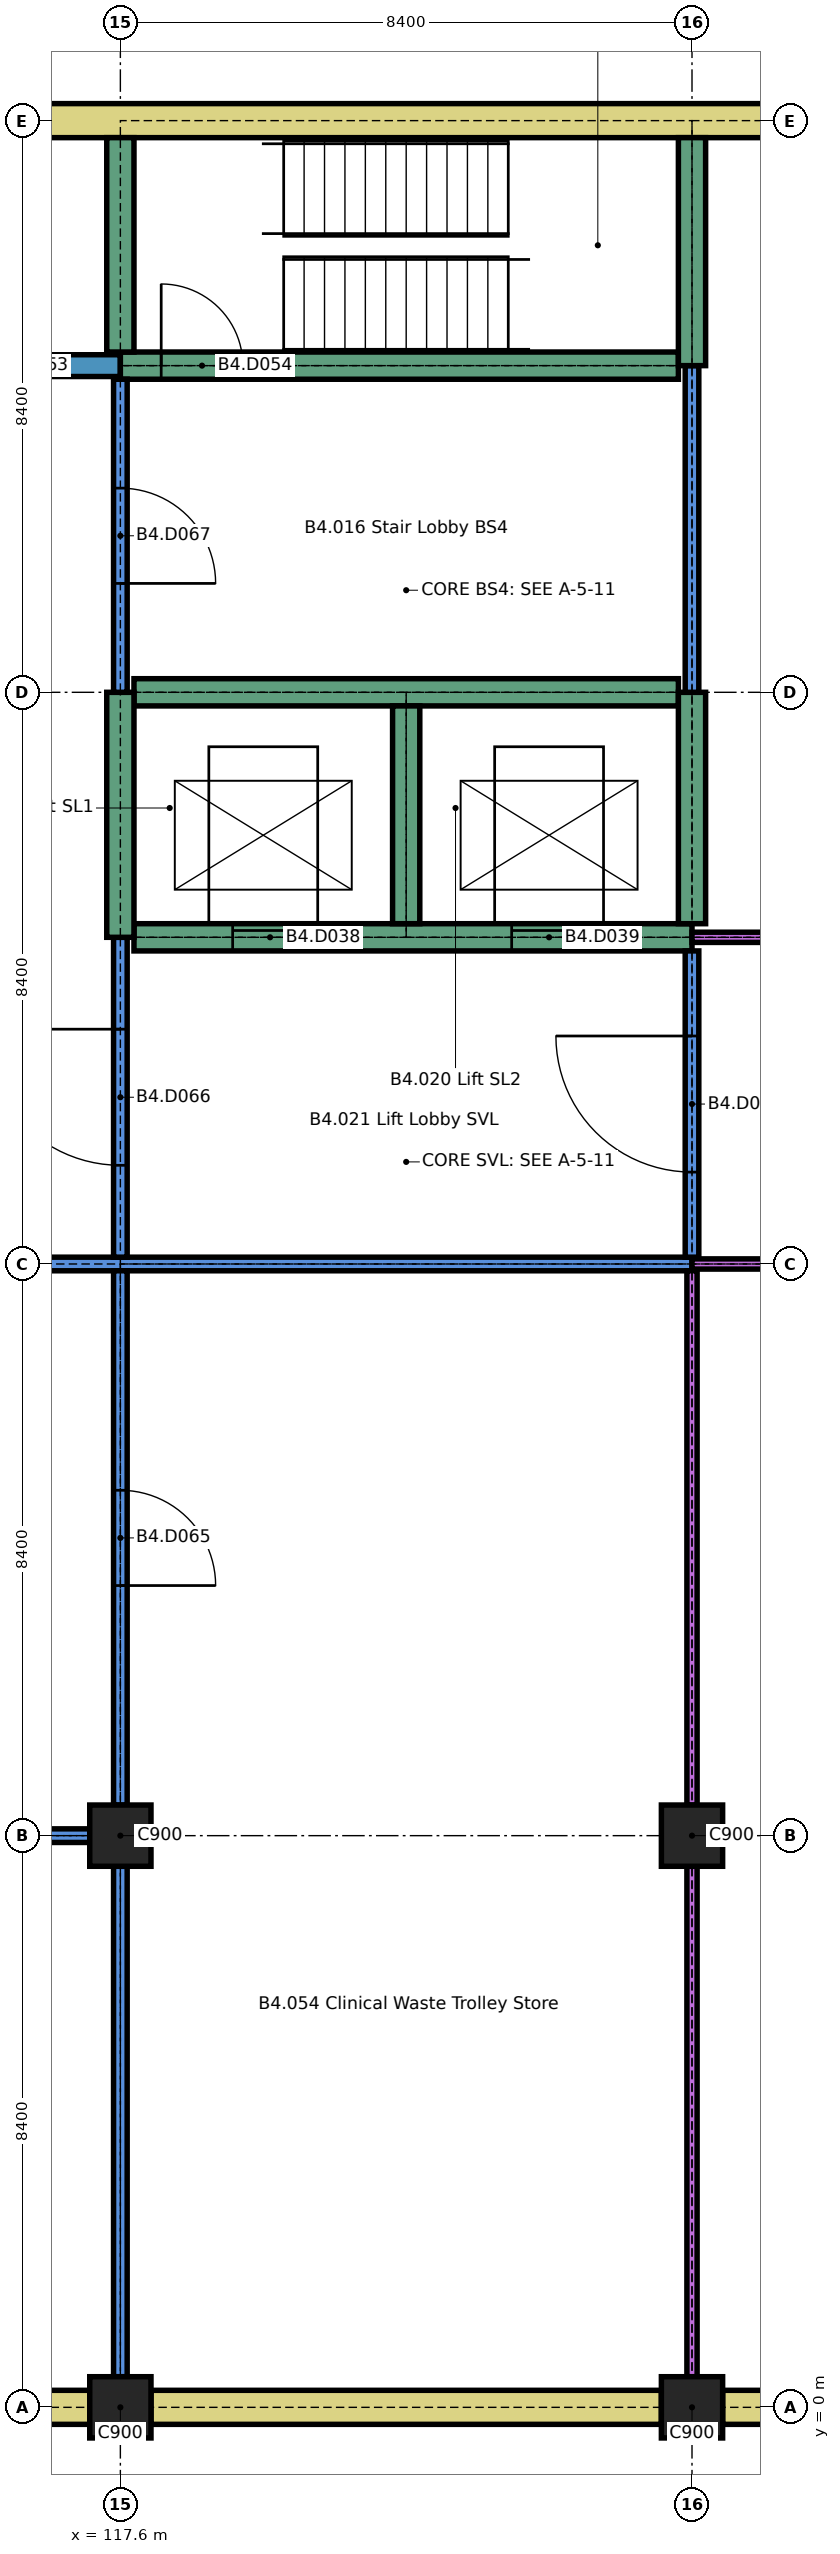
"""IFC4 building model, lengths in metres.
Left out: names, types, materials, properties, quantities, classifications, styles, units other than length and angle.
Written with IfcOpenShell. Run it as: python <this file> out.ifc"""

import sys

from ifc_helpers import new_model, si_unit, direction, frame, frame_2d, origin, origin_2d, place, context, subcontext, project, spatial, rectangle, extrude, element, fill, save


model = new_model("IFC4")
c1 = context("Model", 3, precision=1e-05, world=origin(), true_north=direction((0.0, 1.0)))
c2 = subcontext(c1, "Body", "Model", "MODEL_VIEW")
j1 = project(units=[si_unit("LENGTHUNIT", "METRE"), si_unit("PLANEANGLEUNIT", "RADIAN")], contexts=[c1])
p1 = place(None, origin())
s1 = spatial("IfcSite", under=j1, at=p1, CompositionType="ELEMENT")
p2 = place(p1, origin())
s2 = spatial("IfcBuilding", under=s1, at=p2, CompositionType="ELEMENT")
p3 = place(p2, frame((0.0, 0.0, -15.0)))
s3 = spatial("IfcBuildingStorey", under=s2, at=p3, CompositionType="ELEMENT", Elevation=-15.0)
for number, where, z_axis, x_axis in (
    (1, (117.6, 0.0, 0.0), (0.0, 0.0, 1.0), (1.0, 0.0, 0.0)),
    (2, (126.0, 0.0, 0.0), (0.0, 0.0, 1.0), (1.0, 0.0, 0.0)),
    (3, (117.6, 8.4, 0.0), (0.0, 0.0, 1.0), (1.0, 0.0, 0.0)),
    (4, (126.0, 8.4, 0.0), (0.0, 0.0, 1.0), (1.0, 0.0, 0.0)),
):
    element("IfcColumn", number, at=place(p3, frame(where, z_axis=z_axis, x_axis=x_axis)), inside=s3, PredefinedType="COLUMN", context=c2, shape_type="SweptSolid", body=[
        extrude(rectangle(XDim=0.9, YDim=0.9, at=origin_2d()), origin(), (0.0, 0.0, 1.0), 3.2),
    ])
for number, where, z_axis, x_axis in (
    (5, (109.65, 0.0, 0.0), (0.0, 0.0, 1.0), (1.0, 0.0, 0.0)),
    (6, (118.05, 0.0, 0.0), (0.0, 0.0, 1.0), (1.0, 0.0, 0.0)),
    (7, (126.45, 0.0, 0.0), (0.0, 0.0, 1.0), (1.0, 0.0, 0.0)),
):
    element("IfcWall", number, at=place(p3, frame(where, z_axis=z_axis, x_axis=x_axis)), inside=s3, PredefinedType="SOLIDWALL", context=c2, shape_type="SweptSolid", body=[
        extrude(rectangle(XDim=7.5, YDim=0.5, at=frame_2d((3.75, 0.0))), origin(), (0.0, 0.0, 1.0), 3.2),
    ])
p4 = place(p3, frame((101.25, 33.6, 0.0), z_axis=(0.0, 0.0, 1.0), x_axis=(1.0, 0.0, 0.0)))
e8 = element("IfcWall", 8, at=p4, inside=s3, PredefinedType="SOLIDWALL", context=c2, shape_type="SweptSolid", body=[
    extrude(rectangle(XDim=32.7, YDim=0.5, at=frame_2d((16.35, 0.0))), origin(), (0.0, 0.0, 1.0), 3.2),
])
p5 = place(p3, frame((109.65, 8.4, 0.0), z_axis=(0.0, 0.0, 1.0), x_axis=(1.0, 0.0, 0.0)))
e9 = element("IfcWall", 9, at=p5, inside=s3, PredefinedType="PARTITIONING", context=c2, shape_type="SweptSolid", body=[
    extrude(rectangle(XDim=7.5, YDim=0.2, at=frame_2d((3.75, 0.0))), origin(), (0.0, 0.0, 1.0), 3.2),
])
p6 = place(p5, frame((3.05, 0.0, 0.0)))
e10 = element("IfcOpeningElement", 10, at=p6, cuts=e9, PredefinedType="OPENING", context=c2, shape_type="SweptSolid", body=[
    extrude(rectangle(XDim=1.4, YDim=2.1, at=frame_2d((0.7, 1.05))), frame((0.0, 0.11, 0.0), z_axis=(0.0, -1.0, 0.0), x_axis=(1.0, 0.0, 0.0)), (0.0, 0.0, 1.0), 0.22),
])
p7 = place(p3, frame((109.65, 16.8, 0.0), z_axis=(0.0, 0.0, 1.0), x_axis=(1.0, 0.0, 0.0)))
e11 = element("IfcWall", 11, at=p7, inside=s3, PredefinedType="PARTITIONING", context=c2, shape_type="SweptSolid", body=[
    extrude(rectangle(XDim=16.35, YDim=0.2, at=frame_2d((8.175, 0.0))), origin(), (0.0, 0.0, 1.0), 3.2),
])
p8 = place(p7, frame((3.275, 0.0, 0.0)))
e12 = element("IfcOpeningElement", 12, at=p8, cuts=e11, PredefinedType="OPENING", context=c2, shape_type="SweptSolid", body=[
    extrude(rectangle(XDim=1.4, YDim=2.1, at=frame_2d((0.7, 1.05))), frame((0.0, 0.11, 0.0), z_axis=(0.0, -1.0, 0.0), x_axis=(1.0, 0.0, 0.0)), (0.0, 0.0, 1.0), 0.22),
])
p9 = place(p3, frame((126.0, 16.8, 0.0), z_axis=(0.0, 0.0, 1.0), x_axis=(1.0, 0.0, 0.0)))
e13 = element("IfcWall", 13, at=p9, inside=s3, PredefinedType="PARTITIONING", context=c2, shape_type="SweptSolid", body=[
    extrude(rectangle(XDim=7.95, YDim=0.15, at=frame_2d((3.975, 0.0))), origin(), (0.0, 0.0, 1.0), 3.2),
])
p10 = place(p9, frame((3.275, 0.0, 0.0)))
e14 = element("IfcOpeningElement", 14, at=p10, cuts=e13, PredefinedType="OPENING", context=c2, shape_type="SweptSolid", body=[
    extrude(rectangle(XDim=1.4, YDim=2.1, at=frame_2d((0.7, 1.05))), frame((0.0, 0.085, 0.0), z_axis=(0.0, -1.0, 0.0), x_axis=(1.0, 0.0, 0.0)), (0.0, 0.0, 1.0), 0.17),
])
p11 = place(p3, frame((117.8, 21.6, 0.0), z_axis=(0.0, 0.0, 1.0), x_axis=(1.0, 0.0, 0.0)))
e15 = element("IfcWall", 15, at=p11, inside=s3, PredefinedType="SHEAR", context=c2, shape_type="SweptSolid", body=[
    extrude(rectangle(XDim=8.2, YDim=0.4, at=frame_2d((4.1, 0.0))), origin(), (0.0, 0.0, 1.0), 3.2),
])
p12 = place(p11, frame((1.45, 0.0, 0.0)))
e16 = element("IfcOpeningElement", 16, at=p12, cuts=e15, PredefinedType="OPENING", context=c2, shape_type="SweptSolid", body=[
    extrude(rectangle(XDim=1.1, YDim=2.1, at=frame_2d((0.55, 1.05))), frame((0.0, 0.21, 0.0), z_axis=(0.0, -1.0, 0.0), x_axis=(1.0, 0.0, 0.0)), (0.0, 0.0, 1.0), 0.42),
])
p13 = place(p11, frame((5.55, 0.0, 0.0)))
e17 = element("IfcOpeningElement", 17, at=p13, cuts=e15, PredefinedType="OPENING", context=c2, shape_type="SweptSolid", body=[
    extrude(rectangle(XDim=1.1, YDim=2.1, at=frame_2d((0.55, 1.05))), frame((0.0, 0.21, 0.0), z_axis=(0.0, -1.0, 0.0), x_axis=(1.0, 0.0, 0.0)), (0.0, 0.0, 1.0), 0.42),
])
p14 = place(p3, frame((126.0, 21.6, 0.0), z_axis=(0.0, 0.0, 1.0), x_axis=(1.0, 0.0, 0.0)))
e18 = element("IfcWall", 18, at=p14, inside=s3, PredefinedType="PARTITIONING", context=c2, shape_type="SweptSolid", body=[
    extrude(rectangle(XDim=12.675, YDim=0.15, at=frame_2d((6.337, 0.0))), origin(), (0.0, 0.0, 1.0), 3.2),
])
p15 = place(p14, frame((3.5, 0.0, 0.0)))
e19 = element("IfcOpeningElement", 19, at=p15, cuts=e18, PredefinedType="OPENING", context=c2, shape_type="SweptSolid", body=[
    extrude(rectangle(XDim=1.4, YDim=2.1, at=frame_2d((0.7, 1.05))), frame((0.0, 0.085, 0.0), z_axis=(0.0, -1.0, 0.0), x_axis=(1.0, 0.0, 0.0)), (0.0, 0.0, 1.0), 0.17),
])
p16 = place(p14, frame((9.8, 0.0, 0.0)))
e20 = element("IfcOpeningElement", 20, at=p16, cuts=e18, PredefinedType="OPENING", context=c2, shape_type="SweptSolid", body=[
    extrude(rectangle(XDim=1.4, YDim=2.1, at=frame_2d((0.7, 1.05))), frame((0.0, 0.085, 0.0), z_axis=(0.0, -1.0, 0.0), x_axis=(1.0, 0.0, 0.0)), (0.0, 0.0, 1.0), 0.17),
])
p17 = place(p3, frame((117.8, 25.2, 0.0), z_axis=(0.0, 0.0, 1.0), x_axis=(1.0, 0.0, 0.0)))
e21 = element("IfcWall", 21, at=p17, inside=s3, PredefinedType="SHEAR", context=c2, shape_type="SweptSolid", body=[
    extrude(rectangle(XDim=8.0, YDim=0.4, at=frame_2d((4.0, 0.0))), origin(), (0.0, 0.0, 1.0), 3.2),
])
p18 = place(p3, frame((113.24, 30.0, 0.0), z_axis=(0.0, 0.0, 1.0), x_axis=(1.0, 0.0, 0.0)))
e22 = element("IfcWall", 22, at=p18, inside=s3, PredefinedType="SOLIDWALL", context=c2, shape_type="SweptSolid", body=[
    extrude(rectangle(XDim=4.36, YDim=0.32, at=frame_2d((2.18, 0.0))), origin(), (0.0, 0.0, 1.0), 3.2),
])
p19 = place(p18, frame((1.56, 0.0, 0.0)))
e23 = element("IfcOpeningElement", 23, at=p19, cuts=e22, PredefinedType="OPENING", context=c2, shape_type="SweptSolid", body=[
    extrude(rectangle(XDim=1.4, YDim=2.1, at=frame_2d((0.7, 1.05))), frame((0.0, 0.17, 0.0), z_axis=(0.0, -1.0, 0.0), x_axis=(1.0, 0.0, 0.0)), (0.0, 0.0, 1.0), 0.34),
])
p20 = place(p3, frame((117.6, 30.0, 0.0), z_axis=(0.0, 0.0, 1.0), x_axis=(1.0, 0.0, 0.0)))
e24 = element("IfcWall", 24, at=p20, inside=s3, PredefinedType="SHEAR", context=c2, shape_type="SweptSolid", body=[
    extrude(rectangle(XDim=8.2, YDim=0.4, at=frame_2d((4.1, 0.0))), origin(), (0.0, 0.0, 1.0), 3.2),
])
p21 = place(p20, frame((0.6, 0.0, 0.0)))
e25 = element("IfcOpeningElement", 25, at=p21, cuts=e24, PredefinedType="OPENING", context=c2, shape_type="SweptSolid", body=[
    extrude(rectangle(XDim=1.2, YDim=2.1, at=frame_2d((0.6, 1.05))), frame((0.0, 0.21, 0.0), z_axis=(0.0, -1.0, 0.0), x_axis=(1.0, 0.0, 0.0)), (0.0, 0.0, 1.0), 0.42),
])
p22 = place(p3, frame((117.6, 0.45, 0.0), z_axis=(0.0, 0.0, 1.0), x_axis=(0.0, 1.0, 0.0)))
e26 = element("IfcWall", 26, at=p22, inside=s3, PredefinedType="PARTITIONING", context=c2, shape_type="SweptSolid", body=[
    extrude(rectangle(XDim=7.5, YDim=0.2, at=frame_2d((3.75, 0.0))), origin(), (0.0, 0.0, 1.0), 3.2),
])
p23 = place(p3, frame((117.6, 8.85, 0.0), z_axis=(0.0, 0.0, 1.0), x_axis=(0.0, 1.0, 0.0)))
e27 = element("IfcWall", 27, at=p23, inside=s3, PredefinedType="PARTITIONING", context=c2, shape_type="SweptSolid", body=[
    extrude(rectangle(XDim=7.85, YDim=0.2, at=frame_2d((3.925, 0.0))), origin(), (0.0, 0.0, 1.0), 3.2),
])
p24 = place(p23, frame((3.225, 0.0, 0.0)))
e28 = element("IfcOpeningElement", 28, at=p24, cuts=e27, PredefinedType="OPENING", context=c2, shape_type="SweptSolid", body=[
    extrude(rectangle(XDim=1.4, YDim=2.1, at=frame_2d((0.7, 1.05))), frame((0.0, 0.11, 0.0), z_axis=(0.0, -1.0, 0.0), x_axis=(1.0, 0.0, 0.0)), (0.0, 0.0, 1.0), 0.22),
])
p25 = place(p3, frame((117.6, 16.9, 0.0), z_axis=(0.0, 0.0, 1.0), x_axis=(0.0, 1.0, 0.0)))
e29 = element("IfcWall", 29, at=p25, inside=s3, PredefinedType="PARTITIONING", context=c2, shape_type="SweptSolid", body=[
    extrude(rectangle(XDim=4.7, YDim=0.2, at=frame_2d((2.35, 0.0))), origin(), (0.0, 0.0, 1.0), 3.2),
])
p26 = place(p25, frame((1.35, 0.0, 0.0)))
e30 = element("IfcOpeningElement", 30, at=p26, cuts=e29, PredefinedType="OPENING", context=c2, shape_type="SweptSolid", body=[
    extrude(rectangle(XDim=2.0, YDim=2.4, at=frame_2d((1.0, 1.2))), frame((0.0, 0.11, 0.0), z_axis=(0.0, -1.0, 0.0), x_axis=(1.0, 0.0, 0.0)), (0.0, 0.0, 1.0), 0.22),
])
p27 = place(p3, frame((117.6, 21.6, 0.0), z_axis=(0.0, 0.0, 1.0), x_axis=(0.0, 1.0, 0.0)))
e31 = element("IfcWall", 31, at=p27, inside=s3, PredefinedType="SHEAR", context=c2, shape_type="SweptSolid", body=[
    extrude(rectangle(XDim=3.6, YDim=0.4, at=frame_2d((1.8, 0.0))), origin(), (0.0, 0.0, 1.0), 3.2),
])
p28 = place(p3, frame((117.6, 25.2, 0.0), z_axis=(0.0, 0.0, 1.0), x_axis=(0.0, 1.0, 0.0)))
e32 = element("IfcWall", 32, at=p28, inside=s3, PredefinedType="PARTITIONING", context=c2, shape_type="SweptSolid", body=[
    extrude(rectangle(XDim=4.6, YDim=0.2, at=frame_2d((2.3, 0.0))), origin(), (0.0, 0.0, 1.0), 3.2),
])
p29 = place(p28, frame((1.6, 0.0, 0.0)))
e33 = element("IfcOpeningElement", 33, at=p29, cuts=e32, PredefinedType="OPENING", context=c2, shape_type="SweptSolid", body=[
    extrude(rectangle(XDim=1.4, YDim=2.1, at=frame_2d((0.7, 1.05))), frame((0.0, 0.11, 0.0), z_axis=(0.0, -1.0, 0.0), x_axis=(1.0, 0.0, 0.0)), (0.0, 0.0, 1.0), 0.22),
])
p30 = place(p3, frame((117.6, 30.2, 0.0), z_axis=(0.0, 0.0, 1.0), x_axis=(0.0, 1.0, 0.0)))
e34 = element("IfcWall", 34, at=p30, inside=s3, PredefinedType="SHEAR", context=c2, shape_type="SweptSolid", body=[
    extrude(rectangle(XDim=3.15, YDim=0.4, at=frame_2d((1.575, 0.0))), origin(), (0.0, 0.0, 1.0), 3.2),
])
p31 = place(p3, frame((121.8, 21.8, 0.0), z_axis=(0.0, 0.0, 1.0), x_axis=(0.0, 1.0, 0.0)))
e35 = element("IfcWall", 35, at=p31, inside=s3, PredefinedType="SHEAR", context=c2, shape_type="SweptSolid", body=[
    extrude(rectangle(XDim=3.2, YDim=0.4, at=frame_2d((1.6, 0.0))), origin(), (0.0, 0.0, 1.0), 3.2),
])
p32 = place(p3, frame((126.0, 0.45, 0.0), z_axis=(0.0, 0.0, 1.0), x_axis=(0.0, 1.0, 0.0)))
e36 = element("IfcWall", 36, at=p32, inside=s3, PredefinedType="PARTITIONING", context=c2, shape_type="SweptSolid", body=[
    extrude(rectangle(XDim=7.5, YDim=0.15, at=frame_2d((3.75, 0.0))), origin(), (0.0, 0.0, 1.0), 3.2),
])
p33 = place(p3, frame((126.0, 8.85, 0.0), z_axis=(0.0, 0.0, 1.0), x_axis=(0.0, 1.0, 0.0)))
e37 = element("IfcWall", 37, at=p33, inside=s3, PredefinedType="PARTITIONING", context=c2, shape_type="SweptSolid", body=[
    extrude(rectangle(XDim=7.85, YDim=0.15, at=frame_2d((3.925, 0.0))), origin(), (0.0, 0.0, 1.0), 3.2),
])
p34 = place(p3, frame((126.0, 16.9, 0.0), z_axis=(0.0, 0.0, 1.0), x_axis=(0.0, 1.0, 0.0)))
e38 = element("IfcWall", 38, at=p34, inside=s3, PredefinedType="PARTITIONING", context=c2, shape_type="SweptSolid", body=[
    extrude(rectangle(XDim=4.5, YDim=0.2, at=frame_2d((2.25, 0.0))), origin(), (0.0, 0.0, 1.0), 3.2),
])
p35 = place(p34, frame((1.25, 0.0, 0.0)))
e39 = element("IfcOpeningElement", 39, at=p35, cuts=e38, PredefinedType="OPENING", context=c2, shape_type="SweptSolid", body=[
    extrude(rectangle(XDim=2.0, YDim=2.4, at=frame_2d((1.0, 1.2))), frame((0.0, 0.11, 0.0), z_axis=(0.0, -1.0, 0.0), x_axis=(1.0, 0.0, 0.0)), (0.0, 0.0, 1.0), 0.22),
])
p36 = place(p3, frame((126.0, 21.8, 0.0), z_axis=(0.0, 0.0, 1.0), x_axis=(0.0, 1.0, 0.0)))
e40 = element("IfcWall", 40, at=p36, inside=s3, PredefinedType="SHEAR", context=c2, shape_type="SweptSolid", body=[
    extrude(rectangle(XDim=3.4, YDim=0.4, at=frame_2d((1.7, 0.0))), origin(), (0.0, 0.0, 1.0), 3.2),
])
p37 = place(p3, frame((126.0, 25.2, 0.0), z_axis=(0.0, 0.0, 1.0), x_axis=(0.0, 1.0, 0.0)))
e41 = element("IfcWall", 41, at=p37, inside=s3, PredefinedType="PARTITIONING", context=c2, shape_type="SweptSolid", body=[
    extrude(rectangle(XDim=4.8, YDim=0.2, at=frame_2d((2.4, 0.0))), origin(), (0.0, 0.0, 1.0), 3.2),
])
p38 = place(p3, frame((126.0, 30.0, 0.0), z_axis=(0.0, 0.0, 1.0), x_axis=(0.0, 1.0, 0.0)))
e42 = element("IfcWall", 42, at=p38, inside=s3, PredefinedType="SHEAR", context=c2, shape_type="SweptSolid", body=[
    extrude(rectangle(XDim=3.35, YDim=0.4, at=frame_2d((1.675, 0.0))), origin(), (0.0, 0.0, 1.0), 3.2),
])
p39 = place(p12, origin())
e43 = element("IfcDoor", 43, at=p39, inside=s3, OperationType="SLIDING_TO_LEFT", PredefinedType="DOOR", context=c2, shape_type="SweptSolid", body=[
    extrude(rectangle(XDim=1.1, YDim=2.1, at=frame_2d((0.55, 1.05))), frame((0.0, 0.025, 0.0), z_axis=(0.0, -1.0, 0.0), x_axis=(1.0, 0.0, 0.0)), (0.0, 0.0, 1.0), 0.05),
])
fill(e16, e43)
p40 = place(p13, origin())
e44 = element("IfcDoor", 44, at=p40, inside=s3, OperationType="SLIDING_TO_LEFT", PredefinedType="DOOR", context=c2, shape_type="SweptSolid", body=[
    extrude(rectangle(XDim=1.1, YDim=2.1, at=frame_2d((0.55, 1.05))), frame((0.0, 0.025, 0.0), z_axis=(0.0, -1.0, 0.0), x_axis=(1.0, 0.0, 0.0)), (0.0, 0.0, 1.0), 0.05),
])
fill(e17, e44)
p41 = place(p21, origin())
e45 = element("IfcDoor", 45, at=p41, inside=s3, OperationType="SINGLE_SWING_RIGHT", PredefinedType="DOOR", context=c2, shape_type="SweptSolid", body=[
    extrude(rectangle(XDim=1.2, YDim=2.1, at=frame_2d((0.6, 1.05))), frame((0.0, 0.025, 0.0), z_axis=(0.0, -1.0, 0.0), x_axis=(1.0, 0.0, 0.0)), (0.0, 0.0, 1.0), 0.05),
])
fill(e25, e45)
p42 = place(p24, origin())
e46 = element("IfcDoor", 46, at=p42, inside=s3, OperationType="SINGLE_SWING_LEFT", PredefinedType="DOOR", context=c2, shape_type="SweptSolid", body=[
    extrude(rectangle(XDim=1.4, YDim=2.1, at=frame_2d((0.7, 1.05))), frame((0.0, 0.025, 0.0), z_axis=(0.0, -1.0, 0.0), x_axis=(1.0, 0.0, 0.0)), (0.0, 0.0, 1.0), 0.05),
])
fill(e28, e46)
p43 = place(p26, origin())
e47 = element("IfcDoor", 47, at=p43, inside=s3, OperationType="SINGLE_SWING_LEFT", PredefinedType="DOOR", context=c2, shape_type="SweptSolid", body=[
    extrude(rectangle(XDim=2.0, YDim=2.4, at=frame_2d((1.0, 1.2))), frame((0.0, 0.03, 0.0), z_axis=(0.0, -1.0, 0.0), x_axis=(1.0, 0.0, 0.0)), (0.0, 0.0, 1.0), 0.06),
])
fill(e30, e47)
p44 = place(p29, origin())
e48 = element("IfcDoor", 48, at=p44, inside=s3, OperationType="SINGLE_SWING_LEFT", PredefinedType="DOOR", context=c2, shape_type="SweptSolid", body=[
    extrude(rectangle(XDim=1.4, YDim=2.1, at=frame_2d((0.7, 1.05))), frame((0.0, 0.03, 0.0), z_axis=(0.0, -1.0, 0.0), x_axis=(1.0, 0.0, 0.0)), (0.0, 0.0, 1.0), 0.06),
])
fill(e33, e48)
p45 = place(p35, origin())
e49 = element("IfcDoor", 49, at=p45, inside=s3, OperationType="SINGLE_SWING_LEFT", PredefinedType="DOOR", context=c2, shape_type="SweptSolid", body=[
    extrude(rectangle(XDim=2.0, YDim=2.4, at=frame_2d((1.0, 1.2))), frame((0.0, 0.03, 0.0), z_axis=(0.0, -1.0, 0.0), x_axis=(1.0, 0.0, 0.0)), (0.0, 0.0, 1.0), 0.06),
])
fill(e39, e49)
save(model, sys.argv[1])
